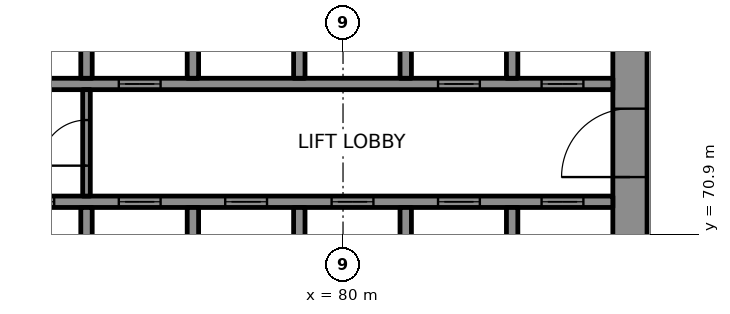
"""IFC4 building model, lengths in metres.
Left out: names, types, materials, properties, quantities, classifications, styles, units other than length and angle.
Written with IfcOpenShell. Run it as: python <this file> out.ifc"""

import sys

from ifc_helpers import new_model, si_unit, direction, frame, frame_2d, origin, place, context, subcontext, project, spatial, rectangle, extrude, element, fill, save


model = new_model("IFC4")
c1 = context("Model", 3, precision=1e-05, world=origin(), true_north=direction((0.0, 1.0)))
c2 = subcontext(c1, "Body", "Model", "MODEL_VIEW")
j1 = project(units=[si_unit("LENGTHUNIT", "METRE"), si_unit("PLANEANGLEUNIT", "RADIAN")], contexts=[c1])
p1 = place(None, origin())
s1 = spatial("IfcSite", under=j1, at=p1, CompositionType="ELEMENT")
p2 = place(p1, origin())
s2 = spatial("IfcBuilding", under=s1, at=p2, CompositionType="ELEMENT")
p3 = place(p2, frame((0.0, 0.0, 26.4)))
s3 = spatial("IfcBuildingStorey", under=s2, at=p3, CompositionType="ELEMENT", Elevation=26.4)
p4 = place(p3, frame((87.55, 66.9, 0.0), z_axis=(0.0, 0.0, 1.0), x_axis=(0.0, 1.0, 0.0)))
e1 = element("IfcWall", 1, at=p4, inside=s3, PredefinedType="SHEAR", context=c2, shape_type="SweptSolid", body=[
    extrude(rectangle(XDim=16.2, YDim=0.9, at=frame_2d((8.1, 0.0))), origin(), (0.0, 0.0, 1.0), 4.15),
])
p5 = place(p4, frame((5.5, 0.0, 0.0)))
e2 = element("IfcOpeningElement", 2, at=p5, cuts=e1, PredefinedType="OPENING", context=c2, shape_type="SweptSolid", body=[
    extrude(rectangle(XDim=1.8, YDim=2.1, at=frame_2d((0.9, 1.05))), frame((0.0, 0.46, 0.0), z_axis=(0.0, -1.0, 0.0), x_axis=(1.0, 0.0, 0.0)), (0.0, 0.0, 1.0), 0.92),
])
p6 = place(p4, frame((12.272, 0.0, 0.0)))
e3 = element("IfcOpeningElement", 3, at=p6, cuts=e1, PredefinedType="OPENING", context=c2, shape_type="SweptSolid", body=[
    extrude(rectangle(XDim=0.9, YDim=2.1, at=frame_2d((0.45, 1.05))), frame((0.0, 0.46, 0.0), z_axis=(0.0, -1.0, 0.0), x_axis=(1.0, 0.0, 0.0)), (0.0, 0.0, 1.0), 0.92),
])
p7 = place(p3, frame((70.3, 71.75, 0.0), z_axis=(0.0, 0.0, 1.0), x_axis=(1.0, 0.0, 0.0)))
e4 = element("IfcWall", 4, at=p7, inside=s3, PredefinedType="SHEAR", context=c2, shape_type="SweptSolid", body=[
    extrude(rectangle(XDim=16.8, YDim=0.3, at=frame_2d((8.4, 0.0))), origin(), (0.0, 0.0, 1.0), 4.15),
])
p8 = place(p7, frame((1.0, 0.0, 0.0)))
e5 = element("IfcOpeningElement", 5, at=p8, cuts=e4, PredefinedType="OPENING", context=c2, shape_type="SweptSolid", body=[
    extrude(rectangle(XDim=1.1, YDim=2.1, at=frame_2d((0.55, 1.05))), frame((0.0, 0.16, 0.0), z_axis=(0.0, -1.0, 0.0), x_axis=(1.0, 0.0, 0.0)), (0.0, 0.0, 1.0), 0.32),
])
p9 = place(p7, frame((3.8, 0.0, 0.0)))
e6 = element("IfcOpeningElement", 6, at=p9, cuts=e4, PredefinedType="OPENING", context=c2, shape_type="SweptSolid", body=[
    extrude(rectangle(XDim=1.1, YDim=2.1, at=frame_2d((0.55, 1.05))), frame((0.0, 0.16, 0.0), z_axis=(0.0, -1.0, 0.0), x_axis=(1.0, 0.0, 0.0)), (0.0, 0.0, 1.0), 0.32),
])
p10 = place(p7, frame((6.6, 0.0, 0.0)))
e7 = element("IfcOpeningElement", 7, at=p10, cuts=e4, PredefinedType="OPENING", context=c2, shape_type="SweptSolid", body=[
    extrude(rectangle(XDim=1.1, YDim=2.1, at=frame_2d((0.55, 1.05))), frame((0.0, 0.16, 0.0), z_axis=(0.0, -1.0, 0.0), x_axis=(1.0, 0.0, 0.0)), (0.0, 0.0, 1.0), 0.32),
])
p11 = place(p7, frame((9.4, 0.0, 0.0)))
e8 = element("IfcOpeningElement", 8, at=p11, cuts=e4, PredefinedType="OPENING", context=c2, shape_type="SweptSolid", body=[
    extrude(rectangle(XDim=1.1, YDim=2.1, at=frame_2d((0.55, 1.05))), frame((0.0, 0.16, 0.0), z_axis=(0.0, -1.0, 0.0), x_axis=(1.0, 0.0, 0.0)), (0.0, 0.0, 1.0), 0.32),
])
p12 = place(p7, frame((12.2, 0.0, 0.0)))
e9 = element("IfcOpeningElement", 9, at=p12, cuts=e4, PredefinedType="OPENING", context=c2, shape_type="SweptSolid", body=[
    extrude(rectangle(XDim=1.1, YDim=2.1, at=frame_2d((0.55, 1.05))), frame((0.0, 0.16, 0.0), z_axis=(0.0, -1.0, 0.0), x_axis=(1.0, 0.0, 0.0)), (0.0, 0.0, 1.0), 0.32),
])
p13 = place(p7, frame((14.925, 0.0, 0.0)))
e10 = element("IfcOpeningElement", 10, at=p13, cuts=e4, PredefinedType="OPENING", context=c2, shape_type="SweptSolid", body=[
    extrude(rectangle(XDim=1.1, YDim=2.1, at=frame_2d((0.55, 1.05))), frame((0.0, 0.16, 0.0), z_axis=(0.0, -1.0, 0.0), x_axis=(1.0, 0.0, 0.0)), (0.0, 0.0, 1.0), 0.32),
])
p14 = place(p3, frame((70.3, 74.85, 0.0), z_axis=(0.0, 0.0, 1.0), x_axis=(1.0, 0.0, 0.0)))
e11 = element("IfcWall", 11, at=p14, inside=s3, PredefinedType="SHEAR", context=c2, shape_type="SweptSolid", body=[
    extrude(rectangle(XDim=16.8, YDim=0.3, at=frame_2d((8.4, 0.0))), origin(), (0.0, 0.0, 1.0), 4.15),
])
p15 = place(p14, frame((3.8, 0.0, 0.0)))
e12 = element("IfcOpeningElement", 12, at=p15, cuts=e11, PredefinedType="OPENING", context=c2, shape_type="SweptSolid", body=[
    extrude(rectangle(XDim=1.1, YDim=2.1, at=frame_2d((0.55, 1.05))), frame((0.0, 0.16, 0.0), z_axis=(0.0, -1.0, 0.0), x_axis=(1.0, 0.0, 0.0)), (0.0, 0.0, 1.0), 0.32),
])
p16 = place(p14, frame((12.2, 0.0, 0.0)))
e13 = element("IfcOpeningElement", 13, at=p16, cuts=e11, PredefinedType="OPENING", context=c2, shape_type="SweptSolid", body=[
    extrude(rectangle(XDim=1.1, YDim=2.1, at=frame_2d((0.55, 1.05))), frame((0.0, 0.16, 0.0), z_axis=(0.0, -1.0, 0.0), x_axis=(1.0, 0.0, 0.0)), (0.0, 0.0, 1.0), 0.32),
])
p17 = place(p14, frame((14.925, 0.0, 0.0)))
e14 = element("IfcOpeningElement", 14, at=p17, cuts=e11, PredefinedType="OPENING", context=c2, shape_type="SweptSolid", body=[
    extrude(rectangle(XDim=1.1, YDim=2.1, at=frame_2d((0.55, 1.05))), frame((0.0, 0.16, 0.0), z_axis=(0.0, -1.0, 0.0), x_axis=(1.0, 0.0, 0.0)), (0.0, 0.0, 1.0), 0.32),
])
for number, where, z_axis, x_axis in (
    (15, (73.25, 69.0, 0.0), (0.0, 0.0, 1.0), (0.0, 1.0, 0.0)),
    (16, (73.25, 75.0, 0.0), (0.0, 0.0, 1.0), (0.0, 1.0, 0.0)),
    (17, (76.05, 69.0, 0.0), (0.0, 0.0, 1.0), (0.0, 1.0, 0.0)),
    (18, (76.05, 75.0, 0.0), (0.0, 0.0, 1.0), (0.0, 1.0, 0.0)),
    (19, (78.85, 69.0, 0.0), (0.0, 0.0, 1.0), (0.0, 1.0, 0.0)),
    (20, (78.85, 75.0, 0.0), (0.0, 0.0, 1.0), (0.0, 1.0, 0.0)),
    (21, (81.65, 69.0, 0.0), (0.0, 0.0, 1.0), (0.0, 1.0, 0.0)),
    (22, (81.65, 75.0, 0.0), (0.0, 0.0, 1.0), (0.0, 1.0, 0.0)),
    (23, (84.45, 69.0, 0.0), (0.0, 0.0, 1.0), (0.0, 1.0, 0.0)),
    (24, (84.45, 75.0, 0.0), (0.0, 0.0, 1.0), (0.0, 1.0, 0.0)),
):
    element("IfcWall", number, at=place(p3, frame(where, z_axis=z_axis, x_axis=x_axis)), inside=s3, PredefinedType="SHEAR", context=c2, shape_type="SweptSolid", body=[
        extrude(rectangle(XDim=2.6, YDim=0.3, at=frame_2d((1.3, 0.0))), origin(), (0.0, 0.0, 1.0), 4.15),
    ])
p18 = place(p3, frame((73.25, 71.9, 0.0), z_axis=(0.0, 0.0, 1.0), x_axis=(0.0, 1.0, 0.0)))
e25 = element("IfcWall", 25, at=p18, inside=s3, PredefinedType="PARTITIONING", context=c2, shape_type="SweptSolid", body=[
    extrude(rectangle(XDim=2.8, YDim=0.2, at=frame_2d((1.4, 0.0))), origin(), (0.0, 0.0, 1.0), 4.15),
])
p19 = place(p18, frame((0.8, 0.0, 0.0)))
e26 = element("IfcOpeningElement", 26, at=p19, cuts=e25, PredefinedType="OPENING", context=c2, shape_type="SweptSolid", body=[
    extrude(rectangle(XDim=1.2, YDim=2.1, at=frame_2d((0.6, 1.05))), frame((0.0, 0.11, 0.0), z_axis=(0.0, -1.0, 0.0), x_axis=(1.0, 0.0, 0.0)), (0.0, 0.0, 1.0), 0.22),
])
p20 = place(p3, frame((107.02, 62.31, 0.0), z_axis=(0.0, 0.0, 1.0), x_axis=(-0.49999992739, 0.866025445706, 0.0)))
e27 = element("IfcWall", 27, at=p20, inside=s3, PredefinedType="PARAPET", context=c2, shape_type="SweptSolid", body=[
    extrude(rectangle(XDim=54.0, YDim=0.2, at=frame_2d((27.0, 0.0))), origin(), (0.0, 0.0, 1.0), 1.1),
])
p21 = place(p8, origin())
e28 = element("IfcDoor", 28, at=p21, inside=s3, OperationType="DOUBLE_DOOR_SLIDING", PredefinedType="DOOR", context=c2, shape_type="SweptSolid", body=[
    extrude(rectangle(XDim=1.1, YDim=2.1, at=frame_2d((0.55, 1.05))), frame((0.0, 0.025, 0.0), z_axis=(0.0, -1.0, 0.0), x_axis=(1.0, 0.0, 0.0)), (0.0, 0.0, 1.0), 0.05),
])
fill(e5, e28)
p22 = place(p9, origin())
e29 = element("IfcDoor", 29, at=p22, inside=s3, OperationType="DOUBLE_DOOR_SLIDING", PredefinedType="DOOR", context=c2, shape_type="SweptSolid", body=[
    extrude(rectangle(XDim=1.1, YDim=2.1, at=frame_2d((0.55, 1.05))), frame((0.0, 0.025, 0.0), z_axis=(0.0, -1.0, 0.0), x_axis=(1.0, 0.0, 0.0)), (0.0, 0.0, 1.0), 0.05),
])
fill(e6, e29)
p23 = place(p10, origin())
e30 = element("IfcDoor", 30, at=p23, inside=s3, OperationType="DOUBLE_DOOR_SLIDING", PredefinedType="DOOR", context=c2, shape_type="SweptSolid", body=[
    extrude(rectangle(XDim=1.1, YDim=2.1, at=frame_2d((0.55, 1.05))), frame((0.0, 0.025, 0.0), z_axis=(0.0, -1.0, 0.0), x_axis=(1.0, 0.0, 0.0)), (0.0, 0.0, 1.0), 0.05),
])
fill(e7, e30)
p24 = place(p11, origin())
e31 = element("IfcDoor", 31, at=p24, inside=s3, OperationType="DOUBLE_DOOR_SLIDING", PredefinedType="DOOR", context=c2, shape_type="SweptSolid", body=[
    extrude(rectangle(XDim=1.1, YDim=2.1, at=frame_2d((0.55, 1.05))), frame((0.0, 0.025, 0.0), z_axis=(0.0, -1.0, 0.0), x_axis=(1.0, 0.0, 0.0)), (0.0, 0.0, 1.0), 0.05),
])
fill(e8, e31)
p25 = place(p12, origin())
e32 = element("IfcDoor", 32, at=p25, inside=s3, OperationType="DOUBLE_DOOR_SLIDING", PredefinedType="DOOR", context=c2, shape_type="SweptSolid", body=[
    extrude(rectangle(XDim=1.1, YDim=2.1, at=frame_2d((0.55, 1.05))), frame((0.0, 0.025, 0.0), z_axis=(0.0, -1.0, 0.0), x_axis=(1.0, 0.0, 0.0)), (0.0, 0.0, 1.0), 0.05),
])
fill(e9, e32)
p26 = place(p13, origin())
e33 = element("IfcDoor", 33, at=p26, inside=s3, OperationType="DOUBLE_DOOR_SLIDING", PredefinedType="DOOR", context=c2, shape_type="SweptSolid", body=[
    extrude(rectangle(XDim=1.1, YDim=2.1, at=frame_2d((0.55, 1.05))), frame((0.0, 0.025, 0.0), z_axis=(0.0, -1.0, 0.0), x_axis=(1.0, 0.0, 0.0)), (0.0, 0.0, 1.0), 0.05),
])
fill(e10, e33)
p27 = place(p15, origin())
e34 = element("IfcDoor", 34, at=p27, inside=s3, OperationType="DOUBLE_DOOR_SLIDING", PredefinedType="DOOR", context=c2, shape_type="SweptSolid", body=[
    extrude(rectangle(XDim=1.1, YDim=2.1, at=frame_2d((0.55, 1.05))), frame((0.0, 0.025, 0.0), z_axis=(0.0, -1.0, 0.0), x_axis=(1.0, 0.0, 0.0)), (0.0, 0.0, 1.0), 0.05),
])
fill(e12, e34)
p28 = place(p16, origin())
e35 = element("IfcDoor", 35, at=p28, inside=s3, OperationType="DOUBLE_DOOR_SLIDING", PredefinedType="DOOR", context=c2, shape_type="SweptSolid", body=[
    extrude(rectangle(XDim=1.1, YDim=2.1, at=frame_2d((0.55, 1.05))), frame((0.0, 0.025, 0.0), z_axis=(0.0, -1.0, 0.0), x_axis=(1.0, 0.0, 0.0)), (0.0, 0.0, 1.0), 0.05),
])
fill(e13, e35)
p29 = place(p17, origin())
e36 = element("IfcDoor", 36, at=p29, inside=s3, OperationType="DOUBLE_DOOR_SLIDING", PredefinedType="DOOR", context=c2, shape_type="SweptSolid", body=[
    extrude(rectangle(XDim=1.1, YDim=2.1, at=frame_2d((0.55, 1.05))), frame((0.0, 0.025, 0.0), z_axis=(0.0, -1.0, 0.0), x_axis=(1.0, 0.0, 0.0)), (0.0, 0.0, 1.0), 0.05),
])
fill(e14, e36)
p30 = place(p19, origin())
e37 = element("IfcDoor", 37, at=p30, inside=s3, OperationType="SINGLE_SWING_LEFT", PredefinedType="DOOR", context=c2, shape_type="SweptSolid", body=[
    extrude(rectangle(XDim=1.2, YDim=2.1, at=frame_2d((0.6, 1.05))), frame((0.0, 0.025, 0.0), z_axis=(0.0, -1.0, 0.0), x_axis=(1.0, 0.0, 0.0)), (0.0, 0.0, 1.0), 0.05),
])
fill(e26, e37)
p31 = place(p5, origin())
e38 = element("IfcDoor", 38, at=p31, inside=s3, OperationType="SINGLE_SWING_RIGHT", PredefinedType="DOOR", context=c2, shape_type="SweptSolid", body=[
    extrude(rectangle(XDim=1.8, YDim=2.1, at=frame_2d((0.9, 1.05))), frame((0.0, 0.17, 0.0), z_axis=(0.0, -1.0, 0.0), x_axis=(1.0, 0.0, 0.0)), (0.0, 0.0, 1.0), 0.34),
])
fill(e2, e38)
save(model, sys.argv[1])
